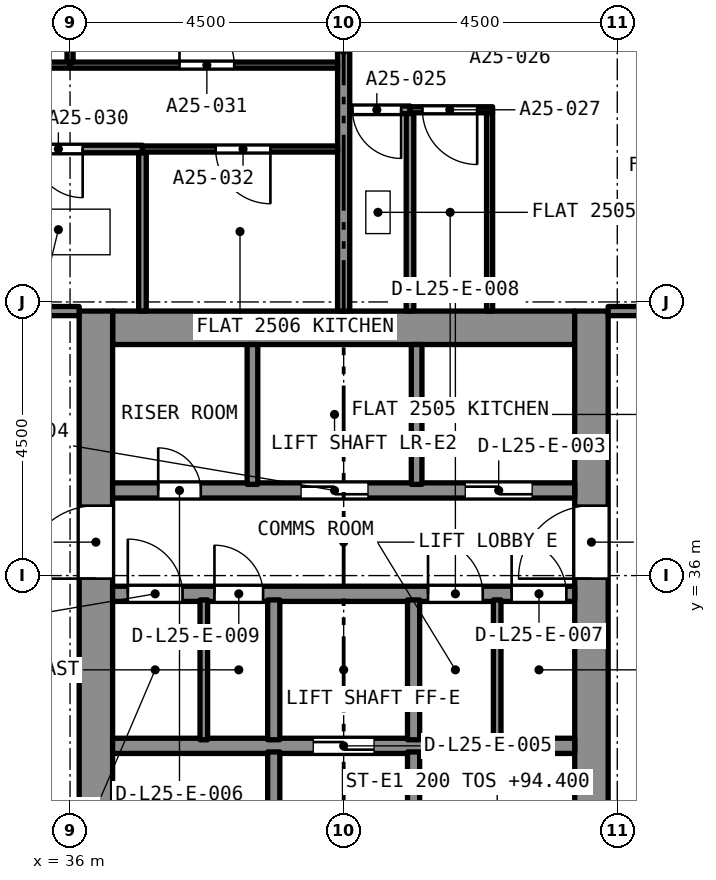
"""IFC4 building model, lengths in metres.
Left out: names, types, materials, properties, quantities, classifications, styles, units other than length and angle.
Written with IfcOpenShell. Run it as: python <this file> out.ifc"""

import sys

from ifc_helpers import new_model, si_unit, direction, frame, frame_2d, origin, place, context, subcontext, project, spatial, rectangle, extrude, element, fill, save


model = new_model("IFC4")
c1 = context("Model", 3, precision=1e-05, world=origin(), true_north=direction((0.0, 1.0)))
c2 = subcontext(c1, "Body", "Model", "MODEL_VIEW")
j1 = project(units=[si_unit("LENGTHUNIT", "METRE"), si_unit("PLANEANGLEUNIT", "RADIAN")], contexts=[c1])
p1 = place(None, origin())
s1 = spatial("IfcSite", under=j1, at=p1, CompositionType="ELEMENT")
p2 = place(p1, origin())
s2 = spatial("IfcBuilding", under=s1, at=p2, CompositionType="ELEMENT")
p3 = place(p2, frame((0.0, 0.0, 92.8)))
s3 = spatial("IfcBuildingStorey", under=s2, at=p3, CompositionType="ELEMENT", Elevation=92.8)
p4 = place(p3, frame((36.7, 40.075, 0.0), z_axis=(0.0, 0.0, 1.0), x_axis=(1.0, 0.0, 0.0)))
e1 = element("IfcWall", 1, at=p4, inside=s3, PredefinedType="SOLIDWALL", context=c2, shape_type="SweptSolid", body=[
    extrude(rectangle(XDim=7.6, YDim=0.55, at=frame_2d((3.8, 0.0))), origin(), (0.0, 0.0, 1.0), 3.2),
])
p5 = place(p3, frame((36.425, 27.15, 0.0), z_axis=(0.0, 0.0, 1.0), x_axis=(0.0, 1.0, 0.0)))
e2 = element("IfcWall", 2, at=p5, inside=s3, PredefinedType="SOLIDWALL", context=c2, shape_type="SweptSolid", body=[
    extrude(rectangle(XDim=13.2, YDim=0.55, at=frame_2d((6.6, 0.0))), origin(), (0.0, 0.0, 1.0), 3.2),
])
p6 = place(p5, frame((8.8, 0.0, 0.0)))
e3 = element("IfcOpeningElement", 3, at=p6, cuts=e2, PredefinedType="OPENING", context=c2, shape_type="SweptSolid", body=[
    extrude(rectangle(XDim=1.2, YDim=2.1, at=frame_2d((0.6, 1.05))), frame((0.0, 0.285, 0.0), z_axis=(0.0, -1.0, 0.0), x_axis=(1.0, 0.0, 0.0)), (0.0, 0.0, 1.0), 0.57),
])
p7 = place(p3, frame((44.575, 27.15, 0.0), z_axis=(0.0, 0.0, 1.0), x_axis=(0.0, 1.0, 0.0)))
e4 = element("IfcWall", 4, at=p7, inside=s3, PredefinedType="SOLIDWALL", context=c2, shape_type="SweptSolid", body=[
    extrude(rectangle(XDim=13.2, YDim=0.55, at=frame_2d((6.6, 0.0))), origin(), (0.0, 0.0, 1.0), 3.2),
])
p8 = place(p7, frame((8.8, 0.0, 0.0)))
e5 = element("IfcOpeningElement", 5, at=p8, cuts=e4, PredefinedType="OPENING", context=c2, shape_type="SweptSolid", body=[
    extrude(rectangle(XDim=1.2, YDim=2.1, at=frame_2d((0.6, 1.05))), frame((0.0, 0.285, 0.0), z_axis=(0.0, -1.0, 0.0), x_axis=(1.0, 0.0, 0.0)), (0.0, 0.0, 1.0), 0.57),
])
p9 = place(p3, frame((41.591, 43.66, 0.0), z_axis=(0.0, 0.0, 1.0), x_axis=(-1.0, 0.0, 0.0)))
e6 = element("IfcWall", 6, at=p9, inside=s3, PredefinedType="PARTITIONING", context=c2, shape_type="SweptSolid", body=[
    extrude(rectangle(XDim=0.991, YDim=0.125, at=frame_2d((0.495, 0.0))), origin(), (0.0, 0.0, 1.0), 2.9),
])
p10 = place(p9, frame((0.146, 0.0, 0.0)))
e7 = element("IfcOpeningElement", 7, at=p10, cuts=e6, PredefinedType="OPENING", context=c2, shape_type="SweptSolid", body=[
    extrude(rectangle(XDim=0.8, YDim=2.1, at=frame_2d((0.4, 1.05))), frame((0.0, 0.073, 0.0), z_axis=(0.0, -1.0, 0.0), x_axis=(1.0, 0.0, 0.0)), (0.0, 0.0, 1.0), 0.145),
])
p11 = place(p3, frame((41.591, 40.35, 0.0), z_axis=(0.0, 0.0, 1.0), x_axis=(0.0, 1.0, 0.0)))
e8 = element("IfcWall", 8, at=p11, inside=s3, PredefinedType="PARTITIONING", context=c2, shape_type="SweptSolid", body=[
    extrude(rectangle(XDim=3.247, YDim=0.125, at=frame_2d((1.624, 0.0))), origin(), (0.0, 0.0, 1.0), 2.9),
])
p12 = place(p3, frame((40.5, 40.35, 0.0), z_axis=(0.0, 0.0, 1.0), x_axis=(0.0, 1.0, 0.0)))
e9 = element("IfcWall", 9, at=p12, inside=s3, PredefinedType="PARTITIONING", context=c2, shape_type="SweptSolid", body=[
    extrude(rectangle(XDim=8.575, YDim=0.2, at=frame_2d((4.288, 0.0))), origin(), (0.0, 0.0, 1.0), 2.9),
])
p13 = place(p3, frame((42.9, 40.35, 0.0), z_axis=(0.0, 0.0, 1.0), x_axis=(0.0, 1.0, 0.0)))
e10 = element("IfcWall", 10, at=p13, inside=s3, PredefinedType="PARTITIONING", context=c2, shape_type="SweptSolid", body=[
    extrude(rectangle(XDim=3.26, YDim=0.1, at=frame_2d((1.63, 0.0))), origin(), (0.0, 0.0, 1.0), 2.9),
])
p14 = place(p3, frame((42.95, 43.66, 0.0), z_axis=(0.0, 0.0, 1.0), x_axis=(-1.0, 0.0, 0.0)))
e11 = element("IfcWall", 11, at=p14, inside=s3, PredefinedType="PARTITIONING", context=c2, shape_type="SweptSolid", body=[
    extrude(rectangle(XDim=1.359, YDim=0.1, at=frame_2d((0.68, 0.0))), origin(), (0.0, 0.0, 1.0), 2.9),
])
p15 = place(p14, frame((0.254, 0.0, 0.0)))
e12 = element("IfcOpeningElement", 12, at=p15, cuts=e11, PredefinedType="OPENING", context=c2, shape_type="SweptSolid", body=[
    extrude(rectangle(XDim=0.9, YDim=2.1, at=frame_2d((0.45, 1.05))), frame((0.0, 0.06, 0.0), z_axis=(0.0, -1.0, 0.0), x_axis=(1.0, 0.0, 0.0)), (0.0, 0.0, 1.0), 0.12),
])
p16 = place(p3, frame((44.85, 40.35, 0.0), z_axis=(0.0, 0.0, 1.0), x_axis=(1.0, 0.0, 0.0)))
e13 = element("IfcWall", 13, at=p16, inside=s3, PredefinedType="PARTITIONING", context=c2, shape_type="SweptSolid", body=[
    extrude(rectangle(XDim=4.075, YDim=0.15, at=frame_2d((2.038, 0.0))), origin(), (0.0, 0.0, 1.0), 2.9),
])
p17 = place(p16, frame((1.9, 0.0, 0.0)))
e14 = element("IfcOpeningElement", 14, at=p17, cuts=e13, PredefinedType="OPENING", context=c2, shape_type="SweptSolid", body=[
    extrude(rectangle(XDim=1.0, YDim=2.1, at=frame_2d((0.5, 1.05))), frame((0.0, 0.085, 0.0), z_axis=(0.0, -1.0, 0.0), x_axis=(1.0, 0.0, 0.0)), (0.0, 0.0, 1.0), 0.17),
])
p18 = place(p3, frame((37.19, 43.015, 0.0), z_axis=(0.0, 0.0, 1.0), x_axis=(-1.0, 0.0, 0.0)))
e15 = element("IfcWall", 15, at=p18, inside=s3, PredefinedType="PARTITIONING", context=c2, shape_type="SweptSolid", body=[
    extrude(rectangle(XDim=2.828, YDim=0.125, at=frame_2d((1.414, 0.0))), origin(), (0.0, 0.0, 1.0), 2.9),
])
p19 = place(p18, frame((0.983, 0.0, 0.0)))
e16 = element("IfcOpeningElement", 16, at=p19, cuts=e15, PredefinedType="OPENING", context=c2, shape_type="SweptSolid", body=[
    extrude(rectangle(XDim=0.8, YDim=2.1, at=frame_2d((0.4, 1.05))), frame((0.0, 0.073, 0.0), z_axis=(0.0, -1.0, 0.0), x_axis=(1.0, 0.0, 0.0)), (0.0, 0.0, 1.0), 0.145),
])
p20 = place(p3, frame((37.191, 40.35, 0.0), z_axis=(0.0, 0.0, 1.0), x_axis=(0.0, 1.0, 0.0)))
e17 = element("IfcWall", 17, at=p20, inside=s3, PredefinedType="PARTITIONING", context=c2, shape_type="SweptSolid", body=[
    extrude(rectangle(XDim=2.602, YDim=0.125, at=frame_2d((1.301, 0.0))), origin(), (0.0, 0.0, 1.0), 2.9),
])
p21 = place(p3, frame((34.425, 40.35, 0.0), z_axis=(0.0, 0.0, 1.0), x_axis=(1.0, 0.0, 0.0)))
e18 = element("IfcWall", 18, at=p21, inside=s3, PredefinedType="PARTITIONING", context=c2, shape_type="SweptSolid", body=[
    extrude(rectangle(XDim=1.725, YDim=0.15, at=frame_2d((0.862, 0.0))), origin(), (0.0, 0.0, 1.0), 2.9),
])
p22 = place(p3, frame((36.0, 44.395, 0.0), z_axis=(0.0, 0.0, 1.0), x_axis=(1.0, 0.0, 0.0)))
e19 = element("IfcWall", 19, at=p22, inside=s3, PredefinedType="PARTITIONING", context=c2, shape_type="SweptSolid", body=[
    extrude(rectangle(XDim=4.4, YDim=0.1, at=frame_2d((2.2, 0.0))), origin(), (0.0, 0.0, 1.0), 2.9),
])
p23 = place(p22, frame((1.8, 0.0, 0.0)))
e20 = element("IfcOpeningElement", 20, at=p23, cuts=e19, PredefinedType="OPENING", context=c2, shape_type="SweptSolid", body=[
    extrude(rectangle(XDim=0.9, YDim=2.1, at=frame_2d((0.45, 1.05))), frame((0.0, 0.06, 0.0), z_axis=(0.0, -1.0, 0.0), x_axis=(1.0, 0.0, 0.0)), (0.0, 0.0, 1.0), 0.12),
])
p24 = place(p3, frame((36.0, 44.445, 0.0), z_axis=(0.0, 0.0, 1.0), x_axis=(0.0, 1.0, 0.0)))
e21 = element("IfcWall", 21, at=p24, inside=s3, PredefinedType="PARTITIONING", context=c2, shape_type="SweptSolid", body=[
    extrude(rectangle(XDim=4.48, YDim=0.1, at=frame_2d((2.24, 0.0))), origin(), (0.0, 0.0, 1.0), 2.9),
])
p25 = place(p3, frame((40.4, 43.015, 0.0), z_axis=(0.0, 0.0, 1.0), x_axis=(-1.0, 0.0, 0.0)))
e22 = element("IfcWall", 22, at=p25, inside=s3, PredefinedType="PARTITIONING", context=c2, shape_type="SweptSolid", body=[
    extrude(rectangle(XDim=3.209, YDim=0.1, at=frame_2d((1.605, 0.0))), origin(), (0.0, 0.0, 1.0), 2.9),
])
p26 = place(p25, frame((1.105, 0.0, 0.0)))
e23 = element("IfcOpeningElement", 23, at=p26, cuts=e22, PredefinedType="OPENING", context=c2, shape_type="SweptSolid", body=[
    extrude(rectangle(XDim=0.9, YDim=2.1, at=frame_2d((0.45, 1.05))), frame((0.0, 0.06, 0.0), z_axis=(0.0, -1.0, 0.0), x_axis=(1.0, 0.0, 0.0)), (0.0, 0.0, 1.0), 0.12),
])
p27 = place(p3, frame((31.6, 44.395, 0.0), z_axis=(0.0, 0.0, 1.0), x_axis=(1.0, 0.0, 0.0)))
e24 = element("IfcWall", 24, at=p27, inside=s3, PredefinedType="PARTITIONING", context=c2, shape_type="SweptSolid", body=[
    extrude(rectangle(XDim=4.4, YDim=0.1, at=frame_2d((2.2, 0.0))), origin(), (0.0, 0.0, 1.0), 2.9),
])
p28 = place(p27, frame((1.65, 0.0, 0.0)))
e25 = element("IfcOpeningElement", 25, at=p28, cuts=e24, PredefinedType="OPENING", context=c2, shape_type="SweptSolid", body=[
    extrude(rectangle(XDim=1.0, YDim=2.1, at=frame_2d((0.5, 1.05))), frame((0.0, 0.06, 0.0), z_axis=(0.0, -1.0, 0.0), x_axis=(1.0, 0.0, 0.0)), (0.0, 0.0, 1.0), 0.12),
])
p29 = place(p3, frame((36.7, 33.2, 0.0), z_axis=(0.0, 0.0, 1.0), x_axis=(1.0, 0.0, 0.0)))
e26 = element("IfcWall", 26, at=p29, inside=s3, PredefinedType="SOLIDWALL", context=c2, shape_type="SweptSolid", body=[
    extrude(rectangle(XDim=7.6, YDim=0.25, at=frame_2d((3.8, 0.0))), origin(), (0.0, 0.0, 1.0), 2.9),
])
p30 = place(p29, frame((3.3, 0.0, 0.0)))
e27 = element("IfcOpeningElement", 27, at=p30, cuts=e26, PredefinedType="OPENING", context=c2, shape_type="SweptSolid", body=[
    extrude(rectangle(XDim=1.0, YDim=2.1, at=frame_2d((0.5, 1.05))), frame((0.0, 0.135, 0.0), z_axis=(0.0, -1.0, 0.0), x_axis=(1.0, 0.0, 0.0)), (0.0, 0.0, 1.0), 0.27),
])
p31 = place(p3, frame((36.7, 35.7, 0.0), z_axis=(0.0, 0.0, 1.0), x_axis=(1.0, 0.0, 0.0)))
e28 = element("IfcWall", 28, at=p31, inside=s3, PredefinedType="SOLIDWALL", context=c2, shape_type="SweptSolid", body=[
    extrude(rectangle(XDim=7.6, YDim=0.25, at=frame_2d((3.8, 0.0))), origin(), (0.0, 0.0, 1.0), 2.9),
])
p32 = place(p31, frame((6.562, 0.0, 0.0)))
e29 = element("IfcOpeningElement", 29, at=p32, cuts=e28, PredefinedType="OPENING", context=c2, shape_type="SweptSolid", body=[
    extrude(rectangle(XDim=0.9, YDim=2.1, at=frame_2d((0.45, 1.05))), frame((0.0, 0.135, 0.0), z_axis=(0.0, -1.0, 0.0), x_axis=(1.0, 0.0, 0.0)), (0.0, 0.0, 1.0), 0.27),
])
p33 = place(p31, frame((5.188, 0.0, 0.0)))
e30 = element("IfcOpeningElement", 30, at=p33, cuts=e28, PredefinedType="OPENING", context=c2, shape_type="SweptSolid", body=[
    extrude(rectangle(XDim=0.9, YDim=2.1, at=frame_2d((0.45, 1.05))), frame((0.0, 0.135, 0.0), z_axis=(0.0, -1.0, 0.0), x_axis=(1.0, 0.0, 0.0)), (0.0, 0.0, 1.0), 0.27),
])
p34 = place(p31, frame((1.675, 0.0, 0.0)))
e31 = element("IfcOpeningElement", 31, at=p34, cuts=e28, PredefinedType="OPENING", context=c2, shape_type="SweptSolid", body=[
    extrude(rectangle(XDim=0.8, YDim=2.1, at=frame_2d((0.4, 1.05))), frame((0.0, 0.135, 0.0), z_axis=(0.0, -1.0, 0.0), x_axis=(1.0, 0.0, 0.0)), (0.0, 0.0, 1.0), 0.27),
])
p35 = place(p31, frame((0.25, 0.0, 0.0)))
e32 = element("IfcOpeningElement", 32, at=p35, cuts=e28, PredefinedType="OPENING", context=c2, shape_type="SweptSolid", body=[
    extrude(rectangle(XDim=0.9, YDim=2.1, at=frame_2d((0.45, 1.05))), frame((0.0, 0.135, 0.0), z_axis=(0.0, -1.0, 0.0), x_axis=(1.0, 0.0, 0.0)), (0.0, 0.0, 1.0), 0.27),
])
p36 = place(p3, frame((36.7, 37.4, 0.0), z_axis=(0.0, 0.0, 1.0), x_axis=(1.0, 0.0, 0.0)))
e33 = element("IfcWall", 33, at=p36, inside=s3, PredefinedType="SOLIDWALL", context=c2, shape_type="SweptSolid", body=[
    extrude(rectangle(XDim=7.6, YDim=0.25, at=frame_2d((3.8, 0.0))), origin(), (0.0, 0.0, 1.0), 2.9),
])
p37 = place(p36, frame((5.8, 0.0, 0.0)))
e34 = element("IfcOpeningElement", 34, at=p37, cuts=e33, PredefinedType="OPENING", context=c2, shape_type="SweptSolid", body=[
    extrude(rectangle(XDim=1.1, YDim=2.4, at=frame_2d((0.55, 1.2))), frame((0.0, 0.135, 0.0), z_axis=(0.0, -1.0, 0.0), x_axis=(1.0, 0.0, 0.0)), (0.0, 0.0, 1.0), 0.27),
])
p38 = place(p36, frame((3.1, 0.0, 0.0)))
e35 = element("IfcOpeningElement", 35, at=p38, cuts=e33, PredefinedType="OPENING", context=c2, shape_type="SweptSolid", body=[
    extrude(rectangle(XDim=1.1, YDim=2.4, at=frame_2d((0.55, 1.2))), frame((0.0, 0.135, 0.0), z_axis=(0.0, -1.0, 0.0), x_axis=(1.0, 0.0, 0.0)), (0.0, 0.0, 1.0), 0.27),
])
p39 = place(p36, frame((0.75, 0.0, 0.0)))
e36 = element("IfcOpeningElement", 36, at=p39, cuts=e33, PredefinedType="OPENING", context=c2, shape_type="SweptSolid", body=[
    extrude(rectangle(XDim=0.7, YDim=2.1, at=frame_2d((0.35, 1.05))), frame((0.0, 0.135, 0.0), z_axis=(0.0, -1.0, 0.0), x_axis=(1.0, 0.0, 0.0)), (0.0, 0.0, 1.0), 0.27),
])
p40 = place(p3, frame((41.65, 27.7, 0.0), z_axis=(0.0, 0.0, 1.0), x_axis=(0.0, 1.0, 0.0)))
e37 = element("IfcWall", 37, at=p40, inside=s3, PredefinedType="SOLIDWALL", context=c2, shape_type="SweptSolid", body=[
    extrude(rectangle(XDim=5.4, YDim=0.2, at=frame_2d((2.7, 0.0))), origin(), (0.0, 0.0, 1.0), 2.9),
])
p41 = place(p40, frame((0.2, 0.0, 0.0)))
e38 = element("IfcOpeningElement", 38, at=p41, cuts=e37, PredefinedType="OPENING", context=c2, shape_type="SweptSolid", body=[
    extrude(rectangle(XDim=0.9, YDim=2.1, at=frame_2d((0.45, 1.05))), frame((0.0, 0.11, 0.0), z_axis=(0.0, -1.0, 0.0), x_axis=(1.0, 0.0, 0.0)), (0.0, 0.0, 1.0), 0.22),
])
p42 = place(p3, frame((39.35, 27.7, 0.0), z_axis=(0.0, 0.0, 1.0), x_axis=(0.0, 1.0, 0.0)))
e39 = element("IfcWall", 39, at=p42, inside=s3, PredefinedType="SOLIDWALL", context=c2, shape_type="SweptSolid", body=[
    extrude(rectangle(XDim=5.4, YDim=0.2, at=frame_2d((2.7, 0.0))), origin(), (0.0, 0.0, 1.0), 2.9),
])
p43 = place(p42, frame((0.2, 0.0, 0.0)))
e40 = element("IfcOpeningElement", 40, at=p43, cuts=e39, PredefinedType="OPENING", context=c2, shape_type="SweptSolid", body=[
    extrude(rectangle(XDim=0.9, YDim=2.1, at=frame_2d((0.45, 1.05))), frame((0.0, 0.11, 0.0), z_axis=(0.0, -1.0, 0.0), x_axis=(1.0, 0.0, 0.0)), (0.0, 0.0, 1.0), 0.22),
])
for number, where, z_axis, x_axis in (
    (41, (41.65, 33.3, 0.0), (0.0, 0.0, 1.0), (0.0, 1.0, 0.0)),
    (42, (39.35, 33.3, 0.0), (0.0, 0.0, 1.0), (0.0, 1.0, 0.0)),
):
    element("IfcWall", number, at=place(p3, frame(where, z_axis=z_axis, x_axis=x_axis)), inside=s3, PredefinedType="SOLIDWALL", context=c2, shape_type="SweptSolid", body=[
        extrude(rectangle(XDim=2.3, YDim=0.2, at=frame_2d((1.15, 0.0))), origin(), (0.0, 0.0, 1.0), 2.9),
    ])
for number, where, z_axis, x_axis in (
    (43, (41.7, 37.5, 0.0), (0.0, 0.0, 1.0), (0.0, 1.0, 0.0)),
    (44, (39.0, 37.5, 0.0), (0.0, 0.0, 1.0), (0.0, 1.0, 0.0)),
):
    element("IfcWall", number, at=place(p3, frame(where, z_axis=z_axis, x_axis=x_axis)), inside=s3, PredefinedType="SOLIDWALL", context=c2, shape_type="SweptSolid", body=[
        extrude(rectangle(XDim=2.3, YDim=0.175, at=frame_2d((1.15, 0.0))), origin(), (0.0, 0.0, 1.0), 2.9),
    ])
for number, where, z_axis, x_axis in (
    (45, (43.025, 33.3, 0.0), (0.0, 0.0, 1.0), (0.0, 1.0, 0.0)),
    (46, (38.2, 33.3, 0.0), (0.0, 0.0, 1.0), (0.0, 1.0, 0.0)),
):
    element("IfcWall", number, at=place(p3, frame(where, z_axis=z_axis, x_axis=x_axis)), inside=s3, PredefinedType="PARTITIONING", context=c2, shape_type="SweptSolid", body=[
        extrude(rectangle(XDim=2.3, YDim=0.125, at=frame_2d((1.15, 0.0))), origin(), (0.0, 0.0, 1.0), 2.9),
    ])
p44 = place(p10, origin())
e47 = element("IfcDoor", 47, at=p44, inside=s3, OperationType="SINGLE_SWING_RIGHT", PredefinedType="DOOR", context=c2, shape_type="SweptSolid", body=[
    extrude(rectangle(XDim=0.8, YDim=2.1, at=frame_2d((0.4, 1.05))), frame((0.0, 0.025, 0.0), z_axis=(0.0, -1.0, 0.0), x_axis=(1.0, 0.0, 0.0)), (0.0, 0.0, 1.0), 0.05),
])
fill(e7, e47)
p45 = place(p15, origin())
e48 = element("IfcDoor", 48, at=p45, inside=s3, OperationType="SINGLE_SWING_RIGHT", PredefinedType="DOOR", context=c2, shape_type="SweptSolid", body=[
    extrude(rectangle(XDim=0.9, YDim=2.1, at=frame_2d((0.45, 1.05))), frame((0.0, 0.025, 0.0), z_axis=(0.0, -1.0, 0.0), x_axis=(1.0, 0.0, 0.0)), (0.0, 0.0, 1.0), 0.05),
])
fill(e12, e48)
p46 = place(p19, origin())
e49 = element("IfcDoor", 49, at=p46, inside=s3, OperationType="SINGLE_SWING_LEFT", PredefinedType="DOOR", context=c2, shape_type="SweptSolid", body=[
    extrude(rectangle(XDim=0.8, YDim=2.1, at=frame_2d((0.4, 1.05))), frame((0.0, 0.025, 0.0), z_axis=(0.0, -1.0, 0.0), x_axis=(1.0, 0.0, 0.0)), (0.0, 0.0, 1.0), 0.05),
])
fill(e16, e49)
p47 = place(p23, origin())
e50 = element("IfcDoor", 50, at=p47, inside=s3, OperationType="SINGLE_SWING_RIGHT", PredefinedType="DOOR", context=c2, shape_type="SweptSolid", body=[
    extrude(rectangle(XDim=0.9, YDim=2.1, at=frame_2d((0.45, 1.05))), frame((0.0, 0.025, 0.0), z_axis=(0.0, -1.0, 0.0), x_axis=(1.0, 0.0, 0.0)), (0.0, 0.0, 1.0), 0.05),
])
fill(e20, e50)
p48 = place(p26, origin())
e51 = element("IfcDoor", 51, at=p48, inside=s3, OperationType="SINGLE_SWING_LEFT", PredefinedType="DOOR", context=c2, shape_type="SweptSolid", body=[
    extrude(rectangle(XDim=0.9, YDim=2.1, at=frame_2d((0.45, 1.05))), frame((0.0, 0.025, 0.0), z_axis=(0.0, -1.0, 0.0), x_axis=(1.0, 0.0, 0.0)), (0.0, 0.0, 1.0), 0.05),
])
fill(e23, e51)
p49 = place(p37, origin())
e52 = element("IfcDoor", 52, at=p49, inside=s3, OperationType="SLIDING_TO_LEFT", PredefinedType="DOOR", context=c2, shape_type="SweptSolid", body=[
    extrude(rectangle(XDim=1.1, YDim=2.4, at=frame_2d((0.55, 1.2))), frame((0.0, 0.025, 0.0), z_axis=(0.0, -1.0, 0.0), x_axis=(1.0, 0.0, 0.0)), (0.0, 0.0, 1.0), 0.05),
])
fill(e34, e52)
p50 = place(p38, origin())
e53 = element("IfcDoor", 53, at=p50, inside=s3, OperationType="SLIDING_TO_LEFT", PredefinedType="DOOR", context=c2, shape_type="SweptSolid", body=[
    extrude(rectangle(XDim=1.1, YDim=2.4, at=frame_2d((0.55, 1.2))), frame((0.0, 0.025, 0.0), z_axis=(0.0, -1.0, 0.0), x_axis=(1.0, 0.0, 0.0)), (0.0, 0.0, 1.0), 0.05),
])
fill(e35, e53)
p51 = place(p30, origin())
e54 = element("IfcDoor", 54, at=p51, inside=s3, OperationType="SLIDING_TO_LEFT", PredefinedType="DOOR", context=c2, shape_type="SweptSolid", body=[
    extrude(rectangle(XDim=1.0, YDim=2.1, at=frame_2d((0.5, 1.05))), frame((0.0, 0.025, 0.0), z_axis=(0.0, -1.0, 0.0), x_axis=(1.0, 0.0, 0.0)), (0.0, 0.0, 1.0), 0.05),
])
fill(e27, e54)
p52 = place(p39, origin())
e55 = element("IfcDoor", 55, at=p52, inside=s3, OperationType="SINGLE_SWING_LEFT", PredefinedType="DOOR", context=c2, shape_type="SweptSolid", body=[
    extrude(rectangle(XDim=0.7, YDim=2.1, at=frame_2d((0.35, 1.05))), frame((0.0, 0.025, 0.0), z_axis=(0.0, -1.0, 0.0), x_axis=(1.0, 0.0, 0.0)), (0.0, 0.0, 1.0), 0.05),
])
fill(e36, e55)
p53 = place(p32, origin())
e56 = element("IfcDoor", 56, at=p53, inside=s3, OperationType="SINGLE_SWING_LEFT", PredefinedType="DOOR", context=c2, shape_type="SweptSolid", body=[
    extrude(rectangle(XDim=0.9, YDim=2.1, at=frame_2d((0.45, 1.05))), frame((0.0, 0.025, 0.0), z_axis=(0.0, -1.0, 0.0), x_axis=(1.0, 0.0, 0.0)), (0.0, 0.0, 1.0), 0.05),
])
fill(e29, e56)
p54 = place(p33, origin())
e57 = element("IfcDoor", 57, at=p54, inside=s3, OperationType="SINGLE_SWING_LEFT", PredefinedType="DOOR", context=c2, shape_type="SweptSolid", body=[
    extrude(rectangle(XDim=0.9, YDim=2.1, at=frame_2d((0.45, 1.05))), frame((0.0, 0.025, 0.0), z_axis=(0.0, -1.0, 0.0), x_axis=(1.0, 0.0, 0.0)), (0.0, 0.0, 1.0), 0.05),
])
fill(e30, e57)
p55 = place(p34, origin())
e58 = element("IfcDoor", 58, at=p55, inside=s3, OperationType="SINGLE_SWING_LEFT", PredefinedType="DOOR", context=c2, shape_type="SweptSolid", body=[
    extrude(rectangle(XDim=0.8, YDim=2.1, at=frame_2d((0.4, 1.05))), frame((0.0, 0.025, 0.0), z_axis=(0.0, -1.0, 0.0), x_axis=(1.0, 0.0, 0.0)), (0.0, 0.0, 1.0), 0.05),
])
fill(e31, e58)
p56 = place(p35, origin())
e59 = element("IfcDoor", 59, at=p56, inside=s3, OperationType="SINGLE_SWING_LEFT", PredefinedType="DOOR", context=c2, shape_type="SweptSolid", body=[
    extrude(rectangle(XDim=0.9, YDim=2.1, at=frame_2d((0.45, 1.05))), frame((0.0, 0.025, 0.0), z_axis=(0.0, -1.0, 0.0), x_axis=(1.0, 0.0, 0.0)), (0.0, 0.0, 1.0), 0.05),
])
fill(e32, e59)
p57 = place(p6, origin())
e60 = element("IfcDoor", 60, at=p57, inside=s3, OperationType="SINGLE_SWING_LEFT", PredefinedType="DOOR", context=c2, shape_type="SweptSolid", body=[
    extrude(rectangle(XDim=1.2, YDim=2.1, at=frame_2d((0.6, 1.05))), frame((0.0, 0.025, 0.0), z_axis=(0.0, -1.0, 0.0), x_axis=(1.0, 0.0, 0.0)), (0.0, 0.0, 1.0), 0.05),
])
fill(e3, e60)
p58 = place(p8, origin())
e61 = element("IfcDoor", 61, at=p58, inside=s3, OperationType="SINGLE_SWING_LEFT", PredefinedType="DOOR", context=c2, shape_type="SweptSolid", body=[
    extrude(rectangle(XDim=1.2, YDim=2.1, at=frame_2d((0.6, 1.05))), frame((0.0, 0.025, 0.0), z_axis=(0.0, -1.0, 0.0), x_axis=(1.0, 0.0, 0.0)), (0.0, 0.0, 1.0), 0.05),
])
fill(e5, e61)
save(model, sys.argv[1])
